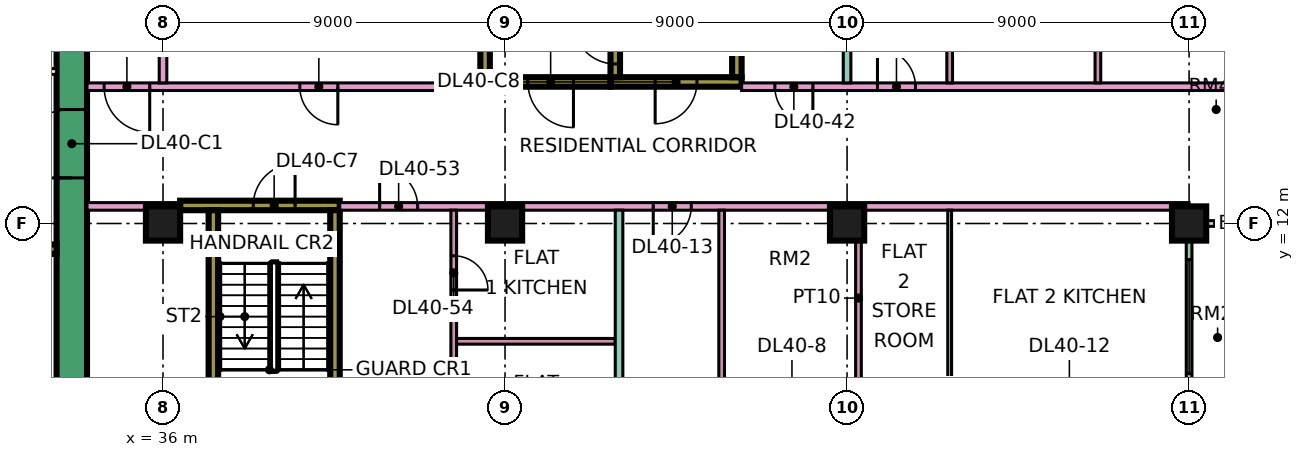
"""IFC4 building model, lengths in metres.
Left out: names, types, materials, properties, quantities, classifications, styles, units other than length and angle.
Written with IfcOpenShell. Run it as: python <this file> out.ifc"""

import sys

from ifc_helpers import new_model, si_unit, direction, frame, frame_2d, origin, origin_2d, place, context, subcontext, project, spatial, rectangle, extrude, element, fill, save


model = new_model("IFC4")
c1 = context("Model", 3, precision=1e-05, world=origin(), true_north=direction((0.0, 1.0)))
c2 = subcontext(c1, "Body", "Model", "MODEL_VIEW")
j1 = project(units=[si_unit("LENGTHUNIT", "METRE"), si_unit("PLANEANGLEUNIT", "RADIAN")], contexts=[c1])
p1 = place(None, origin())
s1 = spatial("IfcSite", under=j1, at=p1, CompositionType="ELEMENT")
p2 = place(p1, origin())
s2 = spatial("IfcBuilding", under=s1, at=p2, CompositionType="ELEMENT")
p3 = place(p2, frame((0.0, 0.0, 176.15)))
s3 = spatial("IfcBuildingStorey", under=s2, at=p3, CompositionType="ELEMENT", Elevation=176.15)
for number, where, z_axis, x_axis in (
    (1, (36.0, 12.0, 0.0), (0.0, 0.0, 1.0), (1.0, 0.0, 0.0)),
    (2, (45.0, 12.0, 0.0), (0.0, 0.0, 1.0), (1.0, 0.0, 0.0)),
    (3, (54.0, 12.0, 0.0), (0.0, 0.0, 1.0), (1.0, 0.0, 0.0)),
    (4, (63.0, 12.0, 0.0), (0.0, 0.0, 1.0), (1.0, 0.0, 0.0)),
):
    element("IfcColumn", number, at=place(p3, frame(where, z_axis=z_axis, x_axis=x_axis)), inside=s3, PredefinedType="COLUMN", context=c2, shape_type="SweptSolid", body=[
        extrude(rectangle(XDim=0.9, YDim=0.9, at=origin_2d()), origin(), (0.0, 0.0, 1.0), 3.75),
    ])
p4 = place(p3, frame((33.6, 7.8, 0.0), z_axis=(0.0, 0.0, 1.0), x_axis=(0.0, 1.0, 0.0)))
e5 = element("IfcWall", 5, at=p4, inside=s3, PredefinedType="SHEAR", context=c2, shape_type="SweptSolid", body=[
    extrude(rectangle(XDim=11.4, YDim=0.8, at=frame_2d((5.7, 0.0))), origin(), (0.0, 0.0, 1.0), 3.75),
])
p5 = place(p4, frame((5.4, 0.0, 0.0)))
e6 = element("IfcOpeningElement", 6, at=p5, cuts=e5, PredefinedType="OPENING", context=c2, shape_type="SweptSolid", body=[
    extrude(rectangle(XDim=1.8, YDim=2.4, at=frame_2d((0.9, 1.2))), frame((0.0, 0.41, 0.0), z_axis=(0.0, -1.0, 0.0), x_axis=(1.0, 0.0, 0.0)), (0.0, 0.0, 1.0), 0.82),
])
p6 = place(p3, frame((13.45, 11.325, 0.0), z_axis=(0.0, 0.0, 1.0), x_axis=(1.0, 0.0, 0.0)))
e7 = element("IfcWall", 7, at=p6, inside=s3, PredefinedType="SHEAR", context=c2, shape_type="SweptSolid", body=[
    extrude(rectangle(XDim=19.75, YDim=0.25, at=frame_2d((9.875, 0.0))), origin(), (0.0, 0.0, 1.0), 3.75),
])
p7 = place(p6, frame((11.65, 0.0, 0.0)))
e8 = element("IfcOpeningElement", 8, at=p7, cuts=e7, PredefinedType="OPENING", context=c2, shape_type="SweptSolid", body=[
    extrude(rectangle(XDim=1.2, YDim=2.2, at=frame_2d((0.6, 1.1))), frame((0.0, 0.135, 0.0), z_axis=(0.0, -1.0, 0.0), x_axis=(1.0, 0.0, 0.0)), (0.0, 0.0, 1.0), 0.27),
])
p8 = place(p6, frame((14.4, 0.0, 0.0)))
e9 = element("IfcOpeningElement", 9, at=p8, cuts=e7, PredefinedType="OPENING", context=c2, shape_type="SweptSolid", body=[
    extrude(rectangle(XDim=1.2, YDim=2.2, at=frame_2d((0.6, 1.1))), frame((0.0, 0.135, 0.0), z_axis=(0.0, -1.0, 0.0), x_axis=(1.0, 0.0, 0.0)), (0.0, 0.0, 1.0), 0.27),
])
p9 = place(p6, frame((17.15, 0.0, 0.0)))
e10 = element("IfcOpeningElement", 10, at=p9, cuts=e7, PredefinedType="OPENING", context=c2, shape_type="SweptSolid", body=[
    extrude(rectangle(XDim=1.2, YDim=2.2, at=frame_2d((0.6, 1.1))), frame((0.0, 0.135, 0.0), z_axis=(0.0, -1.0, 0.0), x_axis=(1.0, 0.0, 0.0)), (0.0, 0.0, 1.0), 0.27),
])
p10 = place(p6, frame((1.55, 0.0, 0.0)))
e11 = element("IfcOpeningElement", 11, at=p10, cuts=e7, PredefinedType="OPENING", context=c2, shape_type="SweptSolid", body=[
    extrude(rectangle(XDim=0.9, YDim=2.1, at=frame_2d((0.45, 1.05))), frame((0.0, 0.135, 0.0), z_axis=(0.0, -1.0, 0.0), x_axis=(1.0, 0.0, 0.0)), (0.0, 0.0, 1.0), 0.27),
])
p11 = place(p6, frame((5.05, 0.0, 0.0)))
e12 = element("IfcOpeningElement", 12, at=p11, cuts=e7, PredefinedType="OPENING", context=c2, shape_type="SweptSolid", body=[
    extrude(rectangle(XDim=0.9, YDim=2.1, at=frame_2d((0.45, 1.05))), frame((0.0, 0.135, 0.0), z_axis=(0.0, -1.0, 0.0), x_axis=(1.0, 0.0, 0.0)), (0.0, 0.0, 1.0), 0.27),
])
p12 = place(p6, frame((8.425, 0.0, 0.0)))
e13 = element("IfcOpeningElement", 13, at=p12, cuts=e7, PredefinedType="OPENING", context=c2, shape_type="SweptSolid", body=[
    extrude(rectangle(XDim=0.9, YDim=2.1, at=frame_2d((0.45, 1.05))), frame((0.0, 0.135, 0.0), z_axis=(0.0, -1.0, 0.0), x_axis=(1.0, 0.0, 0.0)), (0.0, 0.0, 1.0), 0.27),
])
p13 = place(p3, frame((36.45, 12.475, 0.0), z_axis=(0.0, 0.0, 1.0), x_axis=(1.0, 0.0, 0.0)))
e14 = element("IfcWall", 14, at=p13, inside=s3, PredefinedType="SHEAR", context=c2, shape_type="SweptSolid", body=[
    extrude(rectangle(XDim=4.2, YDim=0.25, at=frame_2d((2.1, 0.0))), origin(), (0.0, 0.0, 1.0), 3.75),
])
p14 = place(p13, frame((1.925, 0.0, 0.0)))
e15 = element("IfcOpeningElement", 15, at=p14, cuts=e14, PredefinedType="OPENING", context=c2, shape_type="SweptSolid", body=[
    extrude(rectangle(XDim=1.1, YDim=2.2, at=frame_2d((0.55, 1.1))), frame((0.0, 0.135, 0.0), z_axis=(0.0, -1.0, 0.0), x_axis=(1.0, 0.0, 0.0)), (0.0, 0.0, 1.0), 0.27),
])
for number, where, z_axis, x_axis in (
    (16, (37.325, 5.85, 0.0), (0.0, 0.0, 1.0), (0.0, 1.0, 0.0)),
    (17, (40.525, 5.85, 0.0), (0.0, 0.0, 1.0), (0.0, 1.0, 0.0)),
):
    element("IfcWall", number, at=place(p3, frame(where, z_axis=z_axis, x_axis=x_axis)), inside=s3, PredefinedType="SHEAR", context=c2, shape_type="SweptSolid", body=[
        extrude(rectangle(XDim=6.5, YDim=0.25, at=frame_2d((3.25, 0.0))), origin(), (0.0, 0.0, 1.0), 3.75),
    ])
p15 = place(p3, frame((47.775, 15.725, 0.0), z_axis=(0.0, 0.0, 1.0), x_axis=(1.0, 0.0, 0.0)))
e18 = element("IfcWall", 18, at=p15, inside=s3, PredefinedType="SHEAR", context=c2, shape_type="SweptSolid", body=[
    extrude(rectangle(XDim=3.45, YDim=0.25, at=frame_2d((1.725, 0.0))), origin(), (0.0, 0.0, 1.0), 3.75),
])
p16 = place(p15, frame((1.175, 0.0, 0.0)))
e19 = element("IfcOpeningElement", 19, at=p16, cuts=e18, PredefinedType="OPENING", context=c2, shape_type="SweptSolid", body=[
    extrude(rectangle(XDim=1.1, YDim=2.2, at=frame_2d((0.55, 1.1))), frame((0.0, 0.135, 0.0), z_axis=(0.0, -1.0, 0.0), x_axis=(1.0, 0.0, 0.0)), (0.0, 0.0, 1.0), 0.27),
])
p17 = place(p3, frame((47.9, 15.85, 0.0), z_axis=(0.0, 0.0, 1.0), x_axis=(0.0, 1.0, 0.0)))
e20 = element("IfcWall", 20, at=p17, inside=s3, PredefinedType="SHEAR", context=c2, shape_type="SweptSolid", body=[
    extrude(rectangle(XDim=6.5, YDim=0.25, at=frame_2d((3.25, 0.0))), origin(), (0.0, 0.0, 1.0), 3.75),
])
p18 = place(p17, frame((0.35, 0.0, 0.0)))
e21 = element("IfcOpeningElement", 21, at=p18, cuts=e20, PredefinedType="OPENING", context=c2, shape_type="SweptSolid", body=[
    extrude(rectangle(XDim=1.1, YDim=2.2, at=frame_2d((0.55, 1.1))), frame((0.0, 0.135, 0.0), z_axis=(0.0, -1.0, 0.0), x_axis=(1.0, 0.0, 0.0)), (0.0, 0.0, 1.0), 0.27),
])
p19 = place(p3, frame((51.1, 15.85, 0.0), z_axis=(0.0, 0.0, 1.0), x_axis=(0.0, 1.0, 0.0)))
e22 = element("IfcWall", 22, at=p19, inside=s3, PredefinedType="SHEAR", context=c2, shape_type="SweptSolid", body=[
    extrude(rectangle(XDim=6.5, YDim=0.25, at=frame_2d((3.25, 0.0))), origin(), (0.0, 0.0, 1.0), 3.75),
])
p20 = place(p3, frame((44.35, 15.725, 0.0), z_axis=(0.0, 0.0, 1.0), x_axis=(1.0, 0.0, 0.0)))
e23 = element("IfcWall", 23, at=p20, inside=s3, PredefinedType="SHEAR", context=c2, shape_type="SweptSolid", body=[
    extrude(rectangle(XDim=3.425, YDim=0.25, at=frame_2d((1.712, 0.0))), origin(), (0.0, 0.0, 1.0), 3.75),
])
p21 = place(p20, frame((1.25, 0.0, 0.0)))
e24 = element("IfcOpeningElement", 24, at=p21, cuts=e23, PredefinedType="OPENING", context=c2, shape_type="SweptSolid", body=[
    extrude(rectangle(XDim=1.2, YDim=2.2, at=frame_2d((0.6, 1.1))), frame((0.0, 0.135, 0.0), z_axis=(0.0, -1.0, 0.0), x_axis=(1.0, 0.0, 0.0)), (0.0, 0.0, 1.0), 0.27),
])
p22 = place(p3, frame((44.475, 15.85, 0.0), z_axis=(0.0, 0.0, 1.0), x_axis=(0.0, 1.0, 0.0)))
e25 = element("IfcWall", 25, at=p22, inside=s3, PredefinedType="SHEAR", context=c2, shape_type="SweptSolid", body=[
    extrude(rectangle(XDim=6.5, YDim=0.25, at=frame_2d((3.25, 0.0))), origin(), (0.0, 0.0, 1.0), 3.75),
])
p23 = place(p22, frame((1.75, 0.0, 0.0)))
e26 = element("IfcOpeningElement", 26, at=p23, cuts=e25, PredefinedType="OPENING", context=c2, shape_type="SweptSolid", body=[
    extrude(rectangle(XDim=1.1, YDim=2.2, at=frame_2d((0.55, 1.1))), frame((0.0, 0.135, 0.0), z_axis=(0.0, -1.0, 0.0), x_axis=(1.0, 0.0, 0.0)), (0.0, 0.0, 1.0), 0.27),
])
p24 = place(p22, frame((4.3, 0.0, 0.0)))
e27 = element("IfcOpeningElement", 27, at=p24, cuts=e25, PredefinedType="OPENING", context=c2, shape_type="SweptSolid", body=[
    extrude(rectangle(XDim=1.1, YDim=2.2, at=frame_2d((0.55, 1.1))), frame((0.0, 0.135, 0.0), z_axis=(0.0, -1.0, 0.0), x_axis=(1.0, 0.0, 0.0)), (0.0, 0.0, 1.0), 0.27),
])
p25 = place(p3, frame((63.0, 1.575, 0.0), z_axis=(0.0, 0.0, 1.0), x_axis=(0.0, 1.0, 0.0)))
e28 = element("IfcWall", 28, at=p25, inside=s3, PredefinedType="SOLIDWALL", context=c2, shape_type="SweptSolid", body=[
    extrude(rectangle(XDim=10.35, YDim=0.15, at=frame_2d((5.175, 0.0))), origin(), (0.0, 0.0, 1.0), 3.35),
])
p26 = place(p25, frame((2.137, 0.0, 0.0)))
e29 = element("IfcOpeningElement", 29, at=p26, cuts=e28, PredefinedType="OPENING", context=c2, shape_type="SweptSolid", body=[
    extrude(rectangle(XDim=1.8, YDim=2.4, at=frame_2d((0.9, 1.2))), frame((0.0, 0.085, 0.0), z_axis=(0.0, -1.0, 0.0), x_axis=(1.0, 0.0, 0.0)), (0.0, 0.0, 1.0), 0.17),
])
p27 = place(p25, frame((6.475, 0.0, 0.45)))
e30 = element("IfcOpeningElement", 30, at=p27, cuts=e28, PredefinedType="OPENING", context=c2, shape_type="SweptSolid", body=[
    extrude(rectangle(XDim=3.0, YDim=2.4, at=frame_2d((1.5, 1.2))), frame((0.0, 0.085, 0.0), z_axis=(0.0, -1.0, 0.0), x_axis=(1.0, 0.0, 0.0)), (0.0, 0.0, 1.0), 0.17),
])
p28 = place(p3, frame((64.5, 12.0, 0.0), z_axis=(0.0, 0.0, 1.0), x_axis=(-1.0, 0.0, 0.0)))
e31 = element("IfcWall", 31, at=p28, inside=s3, PredefinedType="SOLIDWALL", context=c2, shape_type="SweptSolid", body=[
    extrude(rectangle(XDim=1.5, YDim=0.15, at=frame_2d((0.75, 0.0))), origin(), (0.0, 0.0, 1.0), 3.35),
])
p29 = place(p3, frame((31.2, 16.0, 0.0), z_axis=(0.0, 0.0, 1.0), x_axis=(1.0, 0.0, 0.0)))
e32 = element("IfcWall", 32, at=p29, inside=s3, PredefinedType="PARTITIONING", context=c2, shape_type="SweptSolid", body=[
    extrude(rectangle(XDim=2.0, YDim=0.15, at=frame_2d((1.0, 0.0))), origin(), (0.0, 0.0, 1.0), 3.35),
])
p30 = place(p3, frame((34.0, 12.45, 0.0), z_axis=(0.0, 0.0, 1.0), x_axis=(1.0, 0.0, 0.0)))
e33 = element("IfcWall", 33, at=p30, inside=s3, PredefinedType="PARTITIONING", context=c2, shape_type="SweptSolid", body=[
    extrude(rectangle(XDim=2.451, YDim=0.2, at=frame_2d((1.226, 0.0))), origin(), (0.0, 0.0, 1.0), 3.35),
])
p31 = place(p3, frame((34.0, 15.6, 0.0), z_axis=(0.0, 0.0, 1.0), x_axis=(1.0, 0.0, 0.0)))
e34 = element("IfcWall", 34, at=p31, inside=s3, PredefinedType="PARTITIONING", context=c2, shape_type="SweptSolid", body=[
    extrude(rectangle(XDim=10.35, YDim=0.2, at=frame_2d((5.175, 0.0))), origin(), (0.0, 0.0, 1.0), 3.35),
])
p32 = place(p31, frame((5.6, 0.0, 0.0)))
e35 = element("IfcOpeningElement", 35, at=p32, cuts=e34, PredefinedType="OPENING", context=c2, shape_type="SweptSolid", body=[
    extrude(rectangle(XDim=1.0, YDim=2.1, at=frame_2d((0.5, 1.05))), frame((0.0, 0.11, 0.0), z_axis=(0.0, -1.0, 0.0), x_axis=(1.0, 0.0, 0.0)), (0.0, 0.0, 1.0), 0.22),
])
p33 = place(p31, frame((0.45, 0.0, 0.0)))
e36 = element("IfcOpeningElement", 36, at=p33, cuts=e34, PredefinedType="OPENING", context=c2, shape_type="SweptSolid", body=[
    extrude(rectangle(XDim=1.2, YDim=2.1, at=frame_2d((0.6, 1.05))), frame((0.0, 0.11, 0.0), z_axis=(0.0, -1.0, 0.0), x_axis=(1.0, 0.0, 0.0)), (0.0, 0.0, 1.0), 0.22),
])
p34 = place(p3, frame((36.0, 15.7, 0.0), z_axis=(0.0, 0.0, 1.0), x_axis=(0.0, 1.0, 0.0)))
e37 = element("IfcWall", 37, at=p34, inside=s3, PredefinedType="PARTITIONING", context=c2, shape_type="SweptSolid", body=[
    extrude(rectangle(XDim=8.3, YDim=0.2, at=frame_2d((4.15, 0.0))), origin(), (0.0, 0.0, 1.0), 3.35),
])
p35 = place(p3, frame((40.65, 12.45, 0.0), z_axis=(0.0, 0.0, 1.0), x_axis=(1.0, 0.0, 0.0)))
e38 = element("IfcWall", 38, at=p35, inside=s3, PredefinedType="PARTITIONING", context=c2, shape_type="SweptSolid", body=[
    extrude(rectangle(XDim=22.35, YDim=0.2, at=frame_2d((11.175, 0.0))), origin(), (0.0, 0.0, 1.0), 3.35),
])
p36 = place(p35, frame((8.25, 0.0, 0.0)))
e39 = element("IfcOpeningElement", 39, at=p36, cuts=e38, PredefinedType="OPENING", context=c2, shape_type="SweptSolid", body=[
    extrude(rectangle(XDim=1.0, YDim=2.1, at=frame_2d((0.5, 1.05))), frame((0.0, 0.11, 0.0), z_axis=(0.0, -1.0, 0.0), x_axis=(1.0, 0.0, 0.0)), (0.0, 0.0, 1.0), 0.22),
])
p37 = place(p35, frame((1.05, 0.0, 0.0)))
e40 = element("IfcOpeningElement", 40, at=p37, cuts=e38, PredefinedType="OPENING", context=c2, shape_type="SweptSolid", body=[
    extrude(rectangle(XDim=1.0, YDim=2.1, at=frame_2d((0.5, 1.05))), frame((0.0, 0.11, 0.0), z_axis=(0.0, -1.0, 0.0), x_axis=(1.0, 0.0, 0.0)), (0.0, 0.0, 1.0), 0.22),
])
p38 = place(p3, frame((43.65, 5.825, 0.0), z_axis=(0.0, 0.0, 1.0), x_axis=(0.0, 1.0, 0.0)))
e41 = element("IfcWall", 41, at=p38, inside=s3, PredefinedType="PARTITIONING", context=c2, shape_type="SweptSolid", body=[
    extrude(rectangle(XDim=6.525, YDim=0.15, at=frame_2d((3.263, 0.0))), origin(), (0.0, 0.0, 1.0), 3.35),
])
p39 = place(p38, frame((4.425, 0.0, 0.0)))
e42 = element("IfcOpeningElement", 42, at=p39, cuts=e41, PredefinedType="OPENING", context=c2, shape_type="SweptSolid", body=[
    extrude(rectangle(XDim=0.9, YDim=2.1, at=frame_2d((0.45, 1.05))), frame((0.0, 0.085, 0.0), z_axis=(0.0, -1.0, 0.0), x_axis=(1.0, 0.0, 0.0)), (0.0, 0.0, 1.0), 0.17),
])
p40 = place(p3, frame((43.725, 8.9, 0.0), z_axis=(0.0, 0.0, 1.0), x_axis=(1.0, 0.0, 0.0)))
e43 = element("IfcWall", 43, at=p40, inside=s3, PredefinedType="PARTITIONING", context=c2, shape_type="SweptSolid", body=[
    extrude(rectangle(XDim=4.175, YDim=0.15, at=frame_2d((2.087, 0.0))), origin(), (0.0, 0.0, 1.0), 3.35),
])
p41 = place(p3, frame((48.0, 0.0, 0.0), z_axis=(0.0, 0.0, 1.0), x_axis=(0.0, 1.0, 0.0)))
e44 = element("IfcWall", 44, at=p41, inside=s3, PredefinedType="PARTITIONING", context=c2, shape_type="SweptSolid", body=[
    extrude(rectangle(XDim=12.35, YDim=0.2, at=frame_2d((6.175, 0.0))), origin(), (0.0, 0.0, 1.0), 3.35),
])
p42 = place(p3, frame((50.7, 7.725, 0.0), z_axis=(0.0, 0.0, 1.0), x_axis=(0.0, 1.0, 0.0)))
e45 = element("IfcWall", 45, at=p42, inside=s3, PredefinedType="PARTITIONING", context=c2, shape_type="SweptSolid", body=[
    extrude(rectangle(XDim=4.625, YDim=0.15, at=frame_2d((2.312, 0.0))), origin(), (0.0, 0.0, 1.0), 3.35),
])
p43 = place(p3, frame((51.225, 15.6, 0.0), z_axis=(0.0, 0.0, 1.0), x_axis=(1.0, 0.0, 0.0)))
e46 = element("IfcWall", 46, at=p43, inside=s3, PredefinedType="PARTITIONING", context=c2, shape_type="SweptSolid", body=[
    extrude(rectangle(XDim=13.125, YDim=0.2, at=frame_2d((6.562, 0.0))), origin(), (0.0, 0.0, 1.0), 3.35),
])
p44 = place(p43, frame((3.575, 0.0, 0.0)))
e47 = element("IfcOpeningElement", 47, at=p44, cuts=e46, PredefinedType="OPENING", context=c2, shape_type="SweptSolid", body=[
    extrude(rectangle(XDim=1.0, YDim=2.1, at=frame_2d((0.5, 1.05))), frame((0.0, 0.11, 0.0), z_axis=(0.0, -1.0, 0.0), x_axis=(1.0, 0.0, 0.0)), (0.0, 0.0, 1.0), 0.22),
])
p45 = place(p43, frame((0.875, 0.0, 0.0)))
e48 = element("IfcOpeningElement", 48, at=p45, cuts=e46, PredefinedType="OPENING", context=c2, shape_type="SweptSolid", body=[
    extrude(rectangle(XDim=1.0, YDim=2.1, at=frame_2d((0.5, 1.05))), frame((0.0, 0.11, 0.0), z_axis=(0.0, -1.0, 0.0), x_axis=(1.0, 0.0, 0.0)), (0.0, 0.0, 1.0), 0.22),
])
p46 = place(p3, frame((54.0, 15.7, 0.0), z_axis=(0.0, 0.0, 1.0), x_axis=(0.0, 1.0, 0.0)))
e49 = element("IfcWall", 49, at=p46, inside=s3, PredefinedType="PARTITIONING", context=c2, shape_type="SweptSolid", body=[
    extrude(rectangle(XDim=8.226, YDim=0.2, at=frame_2d((4.113, 0.0))), origin(), (0.0, 0.0, 1.0), 3.35),
])
p47 = place(p3, frame((54.3, 7.725, 0.0), z_axis=(0.0, 0.0, 1.0), x_axis=(0.0, 1.0, 0.0)))
e50 = element("IfcWall", 50, at=p47, inside=s3, PredefinedType="PARTITIONING", context=c2, shape_type="SweptSolid", body=[
    extrude(rectangle(XDim=4.625, YDim=0.15, at=frame_2d((2.312, 0.0))), origin(), (0.0, 0.0, 1.0), 3.35),
])
p48 = place(p3, frame((56.7, 7.725, 0.0), z_axis=(0.0, 0.0, 1.0), x_axis=(0.0, 1.0, 0.0)))
e51 = element("IfcWall", 51, at=p48, inside=s3, PredefinedType="PARTITIONING", context=c2, shape_type="SweptSolid", body=[
    extrude(rectangle(XDim=4.625, YDim=0.1, at=frame_2d((2.312, 0.0))), origin(), (0.0, 0.0, 1.0), 3.35),
])
for number, where, z_axis, x_axis in (
    (52, (56.7, 15.7, 0.0), (0.0, 0.0, 1.0), (0.0, 1.0, 0.0)),
    (53, (60.6, 15.7, 0.0), (0.0, 0.0, 1.0), (0.0, 1.0, 0.0)),
):
    element("IfcWall", number, at=place(p3, frame(where, z_axis=z_axis, x_axis=x_axis)), inside=s3, PredefinedType="PARTITIONING", context=c2, shape_type="SweptSolid", body=[
        extrude(rectangle(XDim=2.825, YDim=0.15, at=frame_2d((1.413, 0.0))), origin(), (0.0, 0.0, 1.0), 3.35),
    ])
p49 = place(p27, origin())
e54 = element("IfcWindow", 54, at=p49, inside=s3, PartitioningType="SINGLE_PANEL", PredefinedType="WINDOW", context=c2, shape_type="SweptSolid", body=[
    extrude(rectangle(XDim=3.0, YDim=2.4, at=frame_2d((1.5, 1.2))), frame((0.0, 0.03, 0.0), z_axis=(0.0, -1.0, 0.0), x_axis=(1.0, 0.0, 0.0)), (0.0, 0.0, 1.0), 0.06),
])
fill(e30, e54)
p50 = place(p5, origin())
e55 = element("IfcDoor", 55, at=p50, inside=s3, OperationType="DOUBLE_DOOR_SINGLE_SWING", PredefinedType="DOOR", context=c2, shape_type="SweptSolid", body=[
    extrude(rectangle(XDim=1.8, YDim=2.4, at=frame_2d((0.9, 1.2))), frame((0.0, 0.025, 0.0), z_axis=(0.0, -1.0, 0.0), x_axis=(1.0, 0.0, 0.0)), (0.0, 0.0, 1.0), 0.05),
])
fill(e6, e55)
p51 = place(p14, frame((1.1, 0.0, 0.0), z_axis=(0.0, 0.0, 1.0), x_axis=(-1.0, 0.0, 0.0)))
e56 = element("IfcDoor", 56, at=p51, inside=s3, OperationType="SINGLE_SWING_RIGHT", PredefinedType="DOOR", context=c2, shape_type="SweptSolid", body=[
    extrude(rectangle(XDim=1.1, YDim=2.2, at=frame_2d((0.55, 1.1))), frame((0.0, 0.025, 0.0), z_axis=(0.0, -1.0, 0.0), x_axis=(1.0, 0.0, 0.0)), (0.0, 0.0, 1.0), 0.05),
])
fill(e15, e56)
p52 = place(p16, frame((1.1, 0.0, 0.0), z_axis=(0.0, 0.0, 1.0), x_axis=(-1.0, 0.0, 0.0)))
e57 = element("IfcDoor", 57, at=p52, inside=s3, OperationType="SINGLE_SWING_LEFT", PredefinedType="DOOR", context=c2, shape_type="SweptSolid", body=[
    extrude(rectangle(XDim=1.1, YDim=2.2, at=frame_2d((0.55, 1.1))), frame((0.0, 0.025, 0.0), z_axis=(0.0, -1.0, 0.0), x_axis=(1.0, 0.0, 0.0)), (0.0, 0.0, 1.0), 0.05),
])
fill(e19, e57)
p53 = place(p21, origin())
e58 = element("IfcDoor", 58, at=p53, inside=s3, OperationType="SINGLE_SWING_RIGHT", PredefinedType="DOOR", context=c2, shape_type="SweptSolid", body=[
    extrude(rectangle(XDim=1.2, YDim=2.2, at=frame_2d((0.6, 1.1))), frame((0.0, 0.025, 0.0), z_axis=(0.0, -1.0, 0.0), x_axis=(1.0, 0.0, 0.0)), (0.0, 0.0, 1.0), 0.05),
])
fill(e24, e58)
p54 = place(p18, frame((1.1, 0.0, 0.0), z_axis=(0.0, 0.0, 1.0), x_axis=(-1.0, 0.0, 0.0)))
e59 = element("IfcDoor", 59, at=p54, inside=s3, OperationType="SINGLE_SWING_RIGHT", PredefinedType="DOOR", context=c2, shape_type="SweptSolid", body=[
    extrude(rectangle(XDim=1.1, YDim=2.2, at=frame_2d((0.55, 1.1))), frame((0.0, 0.025, 0.0), z_axis=(0.0, -1.0, 0.0), x_axis=(1.0, 0.0, 0.0)), (0.0, 0.0, 1.0), 0.05),
])
fill(e21, e59)
p55 = place(p32, origin())
e60 = element("IfcDoor", 60, at=p55, inside=s3, OperationType="SINGLE_SWING_RIGHT", PredefinedType="DOOR", context=c2, shape_type="SweptSolid", body=[
    extrude(rectangle(XDim=1.0, YDim=2.1, at=frame_2d((0.5, 1.05))), frame((0.0, 0.025, 0.0), z_axis=(0.0, -1.0, 0.0), x_axis=(1.0, 0.0, 0.0)), (0.0, 0.0, 1.0), 0.05),
])
fill(e35, e60)
p56 = place(p44, origin())
e61 = element("IfcDoor", 61, at=p56, inside=s3, OperationType="SINGLE_SWING_LEFT", PredefinedType="DOOR", context=c2, shape_type="SweptSolid", body=[
    extrude(rectangle(XDim=1.0, YDim=2.1, at=frame_2d((0.5, 1.05))), frame((0.0, 0.025, 0.0), z_axis=(0.0, -1.0, 0.0), x_axis=(1.0, 0.0, 0.0)), (0.0, 0.0, 1.0), 0.05),
])
fill(e47, e61)
p57 = place(p36, frame((1.0, 0.0, 0.0), z_axis=(0.0, 0.0, 1.0), x_axis=(-1.0, 0.0, 0.0)))
e62 = element("IfcDoor", 62, at=p57, inside=s3, OperationType="SINGLE_SWING_LEFT", PredefinedType="DOOR", context=c2, shape_type="SweptSolid", body=[
    extrude(rectangle(XDim=1.0, YDim=2.1, at=frame_2d((0.5, 1.05))), frame((0.0, 0.025, 0.0), z_axis=(0.0, -1.0, 0.0), x_axis=(1.0, 0.0, 0.0)), (0.0, 0.0, 1.0), 0.05),
])
fill(e39, e62)
p58 = place(p33, origin())
e63 = element("IfcDoor", 63, at=p58, inside=s3, OperationType="SINGLE_SWING_RIGHT", PredefinedType="DOOR", context=c2, shape_type="SweptSolid", body=[
    extrude(rectangle(XDim=1.2, YDim=2.1, at=frame_2d((0.6, 1.05))), frame((0.0, 0.025, 0.0), z_axis=(0.0, -1.0, 0.0), x_axis=(1.0, 0.0, 0.0)), (0.0, 0.0, 1.0), 0.05),
])
fill(e36, e63)
p59 = place(p45, origin())
e64 = element("IfcDoor", 64, at=p59, inside=s3, OperationType="SINGLE_SWING_RIGHT", PredefinedType="DOOR", context=c2, shape_type="SweptSolid", body=[
    extrude(rectangle(XDim=1.0, YDim=2.1, at=frame_2d((0.5, 1.05))), frame((0.0, 0.025, 0.0), z_axis=(0.0, -1.0, 0.0), x_axis=(1.0, 0.0, 0.0)), (0.0, 0.0, 1.0), 0.05),
])
fill(e48, e64)
p60 = place(p37, origin())
e65 = element("IfcDoor", 65, at=p60, inside=s3, OperationType="SINGLE_SWING_LEFT", PredefinedType="DOOR", context=c2, shape_type="SweptSolid", body=[
    extrude(rectangle(XDim=1.0, YDim=2.1, at=frame_2d((0.5, 1.05))), frame((0.0, 0.025, 0.0), z_axis=(0.0, -1.0, 0.0), x_axis=(1.0, 0.0, 0.0)), (0.0, 0.0, 1.0), 0.05),
])
fill(e40, e65)
p61 = place(p39, frame((0.9, 0.0, 0.0), z_axis=(0.0, 0.0, 1.0), x_axis=(-1.0, 0.0, 0.0)))
e66 = element("IfcDoor", 66, at=p61, inside=s3, OperationType="SINGLE_SWING_LEFT", PredefinedType="DOOR", context=c2, shape_type="SweptSolid", body=[
    extrude(rectangle(XDim=0.9, YDim=2.1, at=frame_2d((0.45, 1.05))), frame((0.0, 0.025, 0.0), z_axis=(0.0, -1.0, 0.0), x_axis=(1.0, 0.0, 0.0)), (0.0, 0.0, 1.0), 0.05),
])
fill(e42, e66)
save(model, sys.argv[1])
